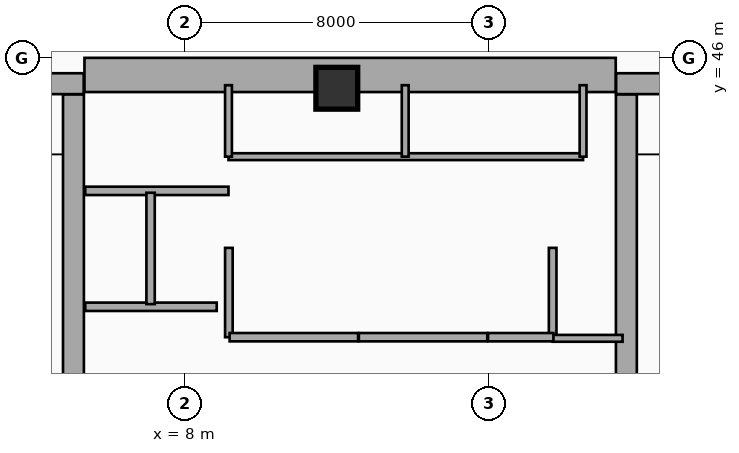
"""IFC4 building model, lengths in metres.
Left out: names, types, materials, properties, quantities, classifications, styles, units other than length and angle.
Written with IfcOpenShell. Run it as: python <this file> out.ifc"""

import sys

from ifc_helpers import new_model, si_unit, direction, frame, frame_2d, origin, origin_2d, place, context, subcontext, project, spatial, rectangle, extrude, element, fill, save


model = new_model("IFC4")
c1 = context("Model", 3, precision=1e-05, world=origin(), true_north=direction((0.0, 1.0)))
c2 = subcontext(c1, "Body", "Model", "MODEL_VIEW")
j1 = project(units=[si_unit("LENGTHUNIT", "METRE"), si_unit("PLANEANGLEUNIT", "RADIAN")], contexts=[c1])
p1 = place(None, origin())
s1 = spatial("IfcSite", under=j1, at=p1, CompositionType="ELEMENT")
p2 = place(p1, origin())
s2 = spatial("IfcBuilding", under=s1, at=p2, CompositionType="ELEMENT")
p3 = place(p2, origin())
s3 = spatial("IfcBuildingStorey", under=s2, at=p3, CompositionType="ELEMENT", Elevation=0.0)
p4 = place(p3, frame((5.36, 45.55, 0.0), z_axis=(0.0, 0.0, 1.0), x_axis=(1.0, 0.0, 0.0)))
e1 = element("IfcWall", 1, at=p4, inside=s3, PredefinedType="SHEAR", context=c2, shape_type="SweptSolid", body=[
    extrude(rectangle(XDim=13.98, YDim=0.9, at=frame_2d((6.99, 0.0))), origin(), (0.0, 0.0, 1.0), 5.94),
])
p5 = place(p3, frame((5.07, 37.15, 0.0), z_axis=(0.0, 0.0, 1.0), x_axis=(0.0, 1.0, 0.0)))
e2 = element("IfcWall", 2, at=p5, inside=s3, PredefinedType="SHEAR", context=c2, shape_type="SweptSolid", body=[
    extrude(rectangle(XDim=7.89, YDim=0.55, at=frame_2d((3.945, 0.0))), origin(), (0.0, 0.0, 1.0), 5.94),
])
p6 = place(p3, frame((1.1, 45.32, 0.0), z_axis=(0.0, 0.0, 1.0), x_axis=(1.0, 0.0, 0.0)))
e3 = element("IfcWall", 3, at=p6, inside=s3, PredefinedType="SHEAR", context=c2, shape_type="SweptSolid", body=[
    extrude(rectangle(XDim=4.24, YDim=0.55, at=frame_2d((2.12, 0.0))), origin(), (0.0, 0.0, 1.0), 5.94),
])
p7 = place(p3, frame((19.62, 37.15, 0.0), z_axis=(0.0, 0.0, 1.0), x_axis=(0.0, 1.0, 0.0)))
e4 = element("IfcWall", 4, at=p7, inside=s3, PredefinedType="SHEAR", context=c2, shape_type="SweptSolid", body=[
    extrude(rectangle(XDim=7.89, YDim=0.55, at=frame_2d((3.945, 0.0))), origin(), (0.0, 0.0, 1.0), 5.94),
])
p8 = place(p3, frame((19.35, 45.32, 0.0), z_axis=(0.0, 0.0, 1.0), x_axis=(1.0, 0.0, 0.0)))
e5 = element("IfcWall", 5, at=p8, inside=s3, PredefinedType="SHEAR", context=c2, shape_type="SweptSolid", body=[
    extrude(rectangle(XDim=3.69, YDim=0.55, at=frame_2d((1.845, 0.0))), origin(), (0.0, 0.0, 1.0), 5.94),
])
p9 = place(p3, frame((12.0, 45.2, 0.0), z_axis=(0.0, 0.0, 1.0), x_axis=(1.0, 0.0, 0.0)))
e6 = element("IfcColumn", 6, at=p9, inside=s3, PredefinedType="COLUMN", context=c2, shape_type="SweptSolid", body=[
    extrude(rectangle(XDim=1.1, YDim=1.1, at=origin_2d()), origin(), (0.0, 0.0, 1.0), 5.94),
])
p10 = place(p3, frame((5.38, 39.45, 0.0), z_axis=(0.0, 0.0, 1.0), x_axis=(1.0, 0.0, 0.0)))
e7 = element("IfcWall", 7, at=p10, inside=s3, PredefinedType="PARTITIONING", context=c2, shape_type="SweptSolid", body=[
    extrude(rectangle(XDim=3.46, YDim=0.22, at=frame_2d((1.73, 0.0))), origin(), (0.0, 0.0, 1.0), 5.62),
])
p11 = place(p3, frame((5.38, 42.5, 0.0), z_axis=(0.0, 0.0, 1.0), x_axis=(1.0, 0.0, 0.0)))
e8 = element("IfcWall", 8, at=p11, inside=s3, PredefinedType="PARTITIONING", context=c2, shape_type="SweptSolid", body=[
    extrude(rectangle(XDim=3.77, YDim=0.22, at=frame_2d((1.885, 0.0))), origin(), (0.0, 0.0, 1.0), 5.62),
])
p12 = place(p11, frame((1.75, 0.0, 0.0), z_axis=(0.0, 0.0, 1.0), x_axis=(-1.0, 0.0, 0.0)))
e9 = element("IfcOpeningElement", 9, at=p12, cuts=e8, PredefinedType="OPENING", context=c2, shape_type="SweptSolid", body=[
    extrude(rectangle(XDim=1.4, YDim=2.2, at=frame_2d((0.7, 1.1))), frame((0.0, 0.12, 0.0), z_axis=(0.0, -1.0, 0.0), x_axis=(1.0, 0.0, 0.0)), (0.0, 0.0, 1.0), 0.24),
])
p13 = place(p11, frame((3.53, 0.0, 0.0), z_axis=(0.0, 0.0, 1.0), x_axis=(-1.0, 0.0, 0.0)))
e10 = element("IfcOpeningElement", 10, at=p13, cuts=e8, PredefinedType="OPENING", context=c2, shape_type="SweptSolid", body=[
    extrude(rectangle(XDim=1.4, YDim=2.2, at=frame_2d((0.7, 1.1))), frame((0.0, 0.12, 0.0), z_axis=(0.0, -1.0, 0.0), x_axis=(1.0, 0.0, 0.0)), (0.0, 0.0, 1.0), 0.24),
])
p14 = place(p3, frame((7.1, 39.52, 0.0), z_axis=(0.0, 0.0, 1.0), x_axis=(0.0, 1.0, 0.0)))
e11 = element("IfcWall", 11, at=p14, inside=s3, PredefinedType="PARTITIONING", context=c2, shape_type="SweptSolid", body=[
    extrude(rectangle(XDim=2.93, YDim=0.22, at=frame_2d((1.465, 0.0))), origin(), (0.0, 0.0, 1.0), 5.62),
])
p15 = place(p14, frame((0.85, 0.0, 0.0)))
e12 = element("IfcOpeningElement", 12, at=p15, cuts=e11, PredefinedType="OPENING", context=c2, shape_type="SweptSolid", body=[
    extrude(rectangle(XDim=1.1, YDim=2.2, at=frame_2d((0.55, 1.1))), frame((0.0, 0.12, 0.0), z_axis=(0.0, -1.0, 0.0), x_axis=(1.0, 0.0, 0.0)), (0.0, 0.0, 1.0), 0.24),
])
for number, where, z_axis, x_axis in (
    (13, (9.16, 38.65, 0.0), (0.0, 0.0, 1.0), (0.0, 1.0, 0.0)),
    (14, (17.68, 38.65, 0.0), (0.0, 0.0, 1.0), (0.0, 1.0, 0.0)),
):
    element("IfcWall", number, at=place(p3, frame(where, z_axis=z_axis, x_axis=x_axis)), inside=s3, PredefinedType="PARTITIONING", context=c2, shape_type="SweptSolid", body=[
        extrude(rectangle(XDim=2.35, YDim=0.2, at=frame_2d((1.175, 0.0))), origin(), (0.0, 0.0, 1.0), 5.62),
    ])
p16 = place(p3, frame((17.68, 38.62, 0.0), z_axis=(0.0, 0.0, 1.0), x_axis=(1.0, 0.0, 0.0)))
e15 = element("IfcWall", 15, at=p16, inside=s3, PredefinedType="PARTITIONING", context=c2, shape_type="SweptSolid", body=[
    extrude(rectangle(XDim=1.84, YDim=0.18, at=frame_2d((0.92, 0.0))), origin(), (0.0, 0.0, 1.0), 5.62),
])
p17 = place(p16, frame((0.24, 0.0, 0.0)))
e16 = element("IfcOpeningElement", 16, at=p17, cuts=e15, PredefinedType="OPENING", context=c2, shape_type="SweptSolid", body=[
    extrude(rectangle(XDim=0.92, YDim=2.1, at=frame_2d((0.46, 1.05))), frame((0.0, 0.1, 0.0), z_axis=(0.0, -1.0, 0.0), x_axis=(1.0, 0.0, 0.0)), (0.0, 0.0, 1.0), 0.2),
])
p18 = place(p3, frame((9.18, 38.65, 0.0), z_axis=(0.0, 0.0, 1.0), x_axis=(1.0, 0.0, 0.0)))
e17 = element("IfcWall", 17, at=p18, inside=s3, PredefinedType="PARTITIONING", context=c2, shape_type="SweptSolid", body=[
    extrude(rectangle(XDim=3.38, YDim=0.22, at=frame_2d((1.69, 0.0))), origin(), (0.0, 0.0, 1.0), 5.62),
])
p19 = place(p18, frame((0.3, 0.0, 0.0)))
e18 = element("IfcOpeningElement", 18, at=p19, cuts=e17, PredefinedType="OPENING", context=c2, shape_type="SweptSolid", body=[
    extrude(rectangle(XDim=1.1, YDim=2.2, at=frame_2d((0.55, 1.1))), frame((0.0, 0.12, 0.0), z_axis=(0.0, -1.0, 0.0), x_axis=(1.0, 0.0, 0.0)), (0.0, 0.0, 1.0), 0.24),
])
p20 = place(p18, frame((1.95, 0.0, 0.0)))
e19 = element("IfcOpeningElement", 19, at=p20, cuts=e17, PredefinedType="OPENING", context=c2, shape_type="SweptSolid", body=[
    extrude(rectangle(XDim=1.1, YDim=2.2, at=frame_2d((0.55, 1.1))), frame((0.0, 0.12, 0.0), z_axis=(0.0, -1.0, 0.0), x_axis=(1.0, 0.0, 0.0)), (0.0, 0.0, 1.0), 0.24),
])
p21 = place(p3, frame((12.58, 38.65, 0.0), z_axis=(0.0, 0.0, 1.0), x_axis=(1.0, 0.0, 0.0)))
e20 = element("IfcWall", 20, at=p21, inside=s3, PredefinedType="PARTITIONING", context=c2, shape_type="SweptSolid", body=[
    extrude(rectangle(XDim=3.38, YDim=0.22, at=frame_2d((1.69, 0.0))), origin(), (0.0, 0.0, 1.0), 5.62),
])
p22 = place(p21, frame((0.3, 0.0, 0.0)))
e21 = element("IfcOpeningElement", 21, at=p22, cuts=e20, PredefinedType="OPENING", context=c2, shape_type="SweptSolid", body=[
    extrude(rectangle(XDim=1.1, YDim=2.2, at=frame_2d((0.55, 1.1))), frame((0.0, 0.12, 0.0), z_axis=(0.0, -1.0, 0.0), x_axis=(1.0, 0.0, 0.0)), (0.0, 0.0, 1.0), 0.24),
])
p23 = place(p21, frame((1.95, 0.0, 0.0)))
e22 = element("IfcOpeningElement", 22, at=p23, cuts=e20, PredefinedType="OPENING", context=c2, shape_type="SweptSolid", body=[
    extrude(rectangle(XDim=1.1, YDim=2.2, at=frame_2d((0.55, 1.1))), frame((0.0, 0.12, 0.0), z_axis=(0.0, -1.0, 0.0), x_axis=(1.0, 0.0, 0.0)), (0.0, 0.0, 1.0), 0.24),
])
p24 = place(p3, frame((15.98, 38.65, 0.0), z_axis=(0.0, 0.0, 1.0), x_axis=(1.0, 0.0, 0.0)))
e23 = element("IfcWall", 23, at=p24, inside=s3, PredefinedType="PARTITIONING", context=c2, shape_type="SweptSolid", body=[
    extrude(rectangle(XDim=1.72, YDim=0.22, at=frame_2d((0.86, 0.0))), origin(), (0.0, 0.0, 1.0), 5.62),
])
p25 = place(p24, frame((0.3, 0.0, 0.0)))
e24 = element("IfcOpeningElement", 24, at=p25, cuts=e23, PredefinedType="OPENING", context=c2, shape_type="SweptSolid", body=[
    extrude(rectangle(XDim=1.1, YDim=2.2, at=frame_2d((0.55, 1.1))), frame((0.0, 0.12, 0.0), z_axis=(0.0, -1.0, 0.0), x_axis=(1.0, 0.0, 0.0)), (0.0, 0.0, 1.0), 0.24),
])
p26 = place(p3, frame((9.15, 43.4, 0.0), z_axis=(0.0, 0.0, 1.0), x_axis=(1.0, 0.0, 0.0)))
e25 = element("IfcWall", 25, at=p26, inside=s3, PredefinedType="PLUMBINGWALL", context=c2, shape_type="SweptSolid", body=[
    extrude(rectangle(XDim=9.33, YDim=0.18, at=frame_2d((4.665, 0.0))), origin(), (0.0, 0.0, 1.0), 5.62),
])
p27 = place(p26, frame((1.88, 0.0, 0.0)))
e26 = element("IfcOpeningElement", 26, at=p27, cuts=e25, PredefinedType="OPENING", context=c2, shape_type="SweptSolid", body=[
    extrude(rectangle(XDim=0.92, YDim=2.1, at=frame_2d((0.46, 1.05))), frame((0.0, 0.1, 0.0), z_axis=(0.0, -1.0, 0.0), x_axis=(1.0, 0.0, 0.0)), (0.0, 0.0, 1.0), 0.2),
])
p28 = place(p26, frame((6.515, 0.0, 0.0)))
e27 = element("IfcOpeningElement", 27, at=p28, cuts=e25, PredefinedType="OPENING", context=c2, shape_type="SweptSolid", body=[
    extrude(rectangle(XDim=0.92, YDim=2.1, at=frame_2d((0.46, 1.05))), frame((0.0, 0.1, 0.0), z_axis=(0.0, -1.0, 0.0), x_axis=(1.0, 0.0, 0.0)), (0.0, 0.0, 1.0), 0.2),
])
for number, where, z_axis, x_axis in (
    (28, (9.15, 43.4, 0.0), (0.0, 0.0, 1.0), (0.0, 1.0, 0.0)),
    (29, (18.48, 43.4, 0.0), (0.0, 0.0, 1.0), (0.0, 1.0, 0.0)),
    (30, (13.8, 43.4, 0.0), (0.0, 0.0, 1.0), (0.0, 1.0, 0.0)),
):
    element("IfcWall", number, at=place(p3, frame(where, z_axis=z_axis, x_axis=x_axis)), inside=s3, PredefinedType="PLUMBINGWALL", context=c2, shape_type="SweptSolid", body=[
        extrude(rectangle(XDim=1.88, YDim=0.18, at=frame_2d((0.94, 0.0))), origin(), (0.0, 0.0, 1.0), 5.62),
    ])
p29 = place(p12, origin())
e31 = element("IfcDoor", 31, at=p29, inside=s3, OperationType="SLIDING_TO_LEFT", PredefinedType="DOOR", context=c2, shape_type="SweptSolid", body=[
    extrude(rectangle(XDim=1.4, YDim=2.2, at=frame_2d((0.7, 1.1))), frame((0.0, 0.025, 0.0), z_axis=(0.0, -1.0, 0.0), x_axis=(1.0, 0.0, 0.0)), (0.0, 0.0, 1.0), 0.05),
])
fill(e9, e31)
p30 = place(p13, origin())
e32 = element("IfcDoor", 32, at=p30, inside=s3, OperationType="SLIDING_TO_LEFT", PredefinedType="DOOR", context=c2, shape_type="SweptSolid", body=[
    extrude(rectangle(XDim=1.4, YDim=2.2, at=frame_2d((0.7, 1.1))), frame((0.0, 0.025, 0.0), z_axis=(0.0, -1.0, 0.0), x_axis=(1.0, 0.0, 0.0)), (0.0, 0.0, 1.0), 0.05),
])
fill(e10, e32)
p31 = place(p15, origin())
e33 = element("IfcDoor", 33, at=p31, inside=s3, OperationType="SLIDING_TO_LEFT", PredefinedType="DOOR", context=c2, shape_type="SweptSolid", body=[
    extrude(rectangle(XDim=1.1, YDim=2.2, at=frame_2d((0.55, 1.1))), frame((0.0, 0.025, 0.0), z_axis=(0.0, -1.0, 0.0), x_axis=(1.0, 0.0, 0.0)), (0.0, 0.0, 1.0), 0.05),
])
fill(e12, e33)
p32 = place(p17, origin())
e34 = element("IfcDoor", 34, at=p32, inside=s3, OperationType="SINGLE_SWING_RIGHT", PredefinedType="DOOR", context=c2, shape_type="SweptSolid", body=[
    extrude(rectangle(XDim=0.92, YDim=2.1, at=frame_2d((0.46, 1.05))), frame((0.0, 0.025, 0.0), z_axis=(0.0, -1.0, 0.0), x_axis=(1.0, 0.0, 0.0)), (0.0, 0.0, 1.0), 0.05),
])
fill(e16, e34)
p33 = place(p19, origin())
e35 = element("IfcDoor", 35, at=p33, inside=s3, OperationType="SLIDING_TO_LEFT", PredefinedType="DOOR", context=c2, shape_type="SweptSolid", body=[
    extrude(rectangle(XDim=1.1, YDim=2.2, at=frame_2d((0.55, 1.1))), frame((0.0, 0.025, 0.0), z_axis=(0.0, -1.0, 0.0), x_axis=(1.0, 0.0, 0.0)), (0.0, 0.0, 1.0), 0.05),
])
fill(e18, e35)
p34 = place(p20, origin())
e36 = element("IfcDoor", 36, at=p34, inside=s3, OperationType="SLIDING_TO_LEFT", PredefinedType="DOOR", context=c2, shape_type="SweptSolid", body=[
    extrude(rectangle(XDim=1.1, YDim=2.2, at=frame_2d((0.55, 1.1))), frame((0.0, 0.025, 0.0), z_axis=(0.0, -1.0, 0.0), x_axis=(1.0, 0.0, 0.0)), (0.0, 0.0, 1.0), 0.05),
])
fill(e19, e36)
p35 = place(p22, origin())
e37 = element("IfcDoor", 37, at=p35, inside=s3, OperationType="SLIDING_TO_RIGHT", PredefinedType="DOOR", context=c2, shape_type="SweptSolid", body=[
    extrude(rectangle(XDim=1.1, YDim=2.2, at=frame_2d((0.55, 1.1))), frame((0.0, 0.025, 0.0), z_axis=(0.0, -1.0, 0.0), x_axis=(1.0, 0.0, 0.0)), (0.0, 0.0, 1.0), 0.05),
])
fill(e21, e37)
p36 = place(p23, origin())
e38 = element("IfcDoor", 38, at=p36, inside=s3, OperationType="SLIDING_TO_RIGHT", PredefinedType="DOOR", context=c2, shape_type="SweptSolid", body=[
    extrude(rectangle(XDim=1.1, YDim=2.2, at=frame_2d((0.55, 1.1))), frame((0.0, 0.025, 0.0), z_axis=(0.0, -1.0, 0.0), x_axis=(1.0, 0.0, 0.0)), (0.0, 0.0, 1.0), 0.05),
])
fill(e22, e38)
p37 = place(p25, origin())
e39 = element("IfcDoor", 39, at=p37, inside=s3, OperationType="SLIDING_TO_LEFT", PredefinedType="DOOR", context=c2, shape_type="SweptSolid", body=[
    extrude(rectangle(XDim=1.1, YDim=2.2, at=frame_2d((0.55, 1.1))), frame((0.0, 0.025, 0.0), z_axis=(0.0, -1.0, 0.0), x_axis=(1.0, 0.0, 0.0)), (0.0, 0.0, 1.0), 0.05),
])
fill(e24, e39)
p38 = place(p27, origin())
e40 = element("IfcDoor", 40, at=p38, inside=s3, OperationType="SINGLE_SWING_LEFT", PredefinedType="DOOR", context=c2, shape_type="SweptSolid", body=[
    extrude(rectangle(XDim=0.92, YDim=2.1, at=frame_2d((0.46, 1.05))), frame((0.0, 0.025, 0.0), z_axis=(0.0, -1.0, 0.0), x_axis=(1.0, 0.0, 0.0)), (0.0, 0.0, 1.0), 0.05),
])
fill(e26, e40)
p39 = place(p28, origin())
e41 = element("IfcDoor", 41, at=p39, inside=s3, OperationType="SINGLE_SWING_RIGHT", PredefinedType="DOOR", context=c2, shape_type="SweptSolid", body=[
    extrude(rectangle(XDim=0.92, YDim=2.1, at=frame_2d((0.46, 1.05))), frame((0.0, 0.025, 0.0), z_axis=(0.0, -1.0, 0.0), x_axis=(1.0, 0.0, 0.0)), (0.0, 0.0, 1.0), 0.05),
])
fill(e27, e41)
save(model, sys.argv[1])
